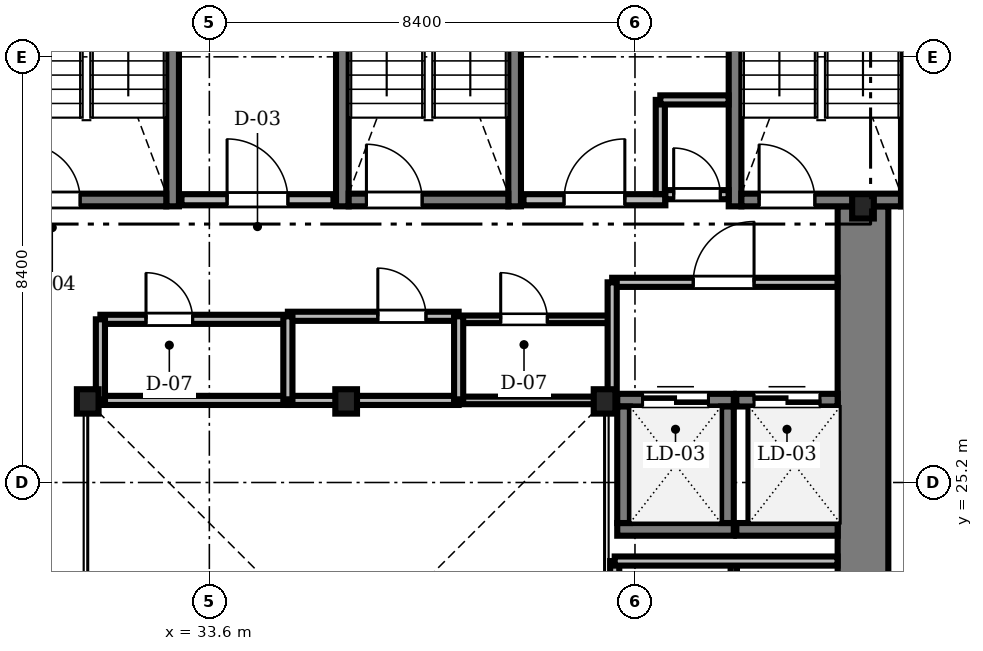
"""IFC4 building model, lengths in metres.
Left out: names, types, materials, properties, quantities, classifications, styles, units other than length and angle.
Written with IfcOpenShell. Run it as: python <this file> out.ifc"""

import sys

from ifc_helpers import new_model, si_unit, direction, frame, frame_2d, origin, origin_2d, place, context, subcontext, project, spatial, rectangle, i_section, extrude, source, transform, mapped, element, fill, save


model = new_model("IFC4")
c1 = context("Model", 3, precision=1e-05, world=origin(), true_north=direction((0.0, 1.0)))
c2 = subcontext(c1, "Body", "Model", "MODEL_VIEW")
j1 = project(units=[si_unit("LENGTHUNIT", "METRE"), si_unit("PLANEANGLEUNIT", "RADIAN")], contexts=[c1])
p1 = place(None, origin())
s1 = spatial("IfcSite", under=j1, at=p1, CompositionType="ELEMENT")
p2 = place(p1, origin())
s2 = spatial("IfcBuilding", under=s1, at=p2, CompositionType="ELEMENT")
p3 = place(p2, frame((0.0, 0.0, 45.85)))
s3 = spatial("IfcBuildingStorey", under=s2, at=p3, CompositionType="ELEMENT", Elevation=45.85)
m1 = source(origin(), c2, "Body", "SweptSolid", [
    extrude(rectangle(XDim=13.15, YDim=1.0, at=frame_2d((6.575, 0.0))), origin(), (0.0, 0.0, 1.0), 3.41),
])
p4 = place(p3, frame((46.5, 17.5, 0.0), z_axis=(0.0, 0.0, 1.0), x_axis=(0.0, 1.0, 0.0)))
e1 = element("IfcWall", 1, at=p4, inside=s3, PredefinedType="SHEAR", context=c2, shape_type="MappedRepresentation", body=[
    mapped(m1, transform((0.0, 0.0, 0.0), scale=1.0)),
])
m2 = source(origin(), c2, "Body", "SweptSolid", [
    extrude(i_section(OverallWidth=0.428, OverallDepth=0.481, WebThickness=0.04, FlangeThickness=0.063, FilletRadius=0.015, at=origin_2d()), origin(), (0.0, 0.0, 1.0), 3.41),
])
for number, where, z_axis, x_axis in (
    (2, (41.4, 26.8, 0.0), (0.0, 0.0, 1.0), (1.0, 0.0, 0.0)),
    (3, (36.3, 26.8, 0.0), (0.0, 0.0, 1.0), (1.0, 0.0, 0.0)),
    (4, (31.2, 26.8, 0.0), (0.0, 0.0, 1.0), (1.0, 0.0, 0.0)),
    (5, (46.5, 30.65, 0.0), (0.0, 0.0, 1.0), (1.0, 0.0, 0.0)),
):
    element("IfcColumn", number, at=place(p3, frame(where, z_axis=z_axis, x_axis=x_axis)), inside=s3, PredefinedType="COLUMN", context=c2, shape_type="MappedRepresentation", body=[
        mapped(m2, transform((0.0, 0.0, 0.0), scale=1.0)),
    ])
m3 = source(origin(), c2, "Body", "SweptSolid", [
    extrude(rectangle(XDim=9.15, YDim=0.25, at=frame_2d((4.575, 0.0))), origin(), (0.0, 0.0, 1.0), 3.45),
])
p5 = place(p3, frame((32.875, 30.65, 0.0), z_axis=(0.0, 0.0, 1.0), x_axis=(0.0, 1.0, 0.0)))
e6 = element("IfcWall", 6, at=p5, inside=s3, PredefinedType="SOLIDWALL", context=c2, shape_type="MappedRepresentation", body=[
    mapped(m3, transform((0.0, 0.0, 0.0), scale=1.0)),
])
m4 = source(origin(), c2, "Body", "SweptSolid", [
    extrude(rectangle(XDim=3.15, YDim=0.25, at=frame_2d((1.575, 0.0))), origin(), (0.0, 0.0, 1.0), 3.45),
])
p6 = place(p3, frame((29.6, 30.775, 0.0), z_axis=(0.0, 0.0, 1.0), x_axis=(1.0, 0.0, 0.0)))
e7 = element("IfcWall", 7, at=p6, inside=s3, PredefinedType="SOLIDWALL", context=c2, shape_type="MappedRepresentation", body=[
    mapped(m4, transform((0.0, 0.0, 0.0), scale=1.0)),
])
m5 = source(origin(), c2, "Body", "SweptSolid", [
    extrude(rectangle(XDim=1.1, YDim=2.2, at=frame_2d((0.55, 1.1))), frame((0.0, 0.135, 0.0), z_axis=(0.0, -1.0, 0.0), x_axis=(1.0, 0.0, 0.0)), (0.0, 0.0, 1.0), 0.27),
])
p7 = place(p6, frame((0.35, 0.0, 0.0)))
e8 = element("IfcOpeningElement", 8, at=p7, cuts=e7, PredefinedType="OPENING", context=c2, shape_type="MappedRepresentation", body=[
    mapped(m5, transform((0.0, 0.0, 0.0), scale=1.0)),
])
for number, where, z_axis, x_axis in (
    (9, (36.225, 30.65, 0.0), (0.0, 0.0, 1.0), (0.0, 1.0, 0.0)),
    (10, (39.625, 30.65, 0.0), (0.0, 0.0, 1.0), (0.0, 1.0, 0.0)),
):
    element("IfcWall", number, at=place(p3, frame(where, z_axis=z_axis, x_axis=x_axis)), inside=s3, PredefinedType="SOLIDWALL", context=c2, shape_type="MappedRepresentation", body=[
        mapped(m3, transform((0.0, 0.0, 0.0), scale=1.0)),
    ])
p8 = place(p3, frame((36.35, 30.775, 0.0), z_axis=(0.0, 0.0, 1.0), x_axis=(1.0, 0.0, 0.0)))
e11 = element("IfcWall", 11, at=p8, inside=s3, PredefinedType="SOLIDWALL", context=c2, shape_type="MappedRepresentation", body=[
    mapped(m4, transform((0.0, 0.0, 0.0), scale=1.0)),
])
p9 = place(p8, frame((0.35, 0.0, 0.0)))
e12 = element("IfcOpeningElement", 12, at=p9, cuts=e11, PredefinedType="OPENING", context=c2, shape_type="MappedRepresentation", body=[
    mapped(m5, transform((0.0, 0.0, 0.0), scale=1.0)),
])
for number, where, z_axis, x_axis in (
    (13, (43.975, 30.65, 0.0), (0.0, 0.0, 1.0), (0.0, 1.0, 0.0)),
    (14, (47.375, 30.65, 0.0), (0.0, 0.0, 1.0), (0.0, 1.0, 0.0)),
):
    element("IfcWall", number, at=place(p3, frame(where, z_axis=z_axis, x_axis=x_axis)), inside=s3, PredefinedType="SOLIDWALL", context=c2, shape_type="MappedRepresentation", body=[
        mapped(m3, transform((0.0, 0.0, 0.0), scale=1.0)),
    ])
p10 = place(p3, frame((44.1, 30.775, 0.0), z_axis=(0.0, 0.0, 1.0), x_axis=(1.0, 0.0, 0.0)))
e15 = element("IfcWall", 15, at=p10, inside=s3, PredefinedType="SOLIDWALL", context=c2, shape_type="MappedRepresentation", body=[
    mapped(m4, transform((0.0, 0.0, 0.0), scale=1.0)),
])
p11 = place(p10, frame((0.35, 0.0, 0.0)))
e16 = element("IfcOpeningElement", 16, at=p11, cuts=e15, PredefinedType="OPENING", context=c2, shape_type="MappedRepresentation", body=[
    mapped(m5, transform((0.0, 0.0, 0.0), scale=1.0)),
])
m6 = source(origin(), c2, "Body", "SweptSolid", [
    extrude(rectangle(XDim=3.0, YDim=0.22, at=frame_2d((1.5, 0.0))), origin(), (0.0, 0.0, 1.0), 3.41),
])
p12 = place(p3, frame((33.05, 30.78, 0.0), z_axis=(0.0, 0.0, 1.0), x_axis=(1.0, 0.0, 0.0)))
e17 = element("IfcWall", 17, at=p12, inside=s3, PredefinedType="SOLIDWALL", context=c2, shape_type="MappedRepresentation", body=[
    mapped(m6, transform((0.0, 0.0, 0.0), scale=1.0)),
])
m7 = source(origin(), c2, "Body", "SweptSolid", [
    extrude(rectangle(XDim=1.2, YDim=2.2, at=frame_2d((0.6, 1.1))), frame((0.0, 0.12, 0.0), z_axis=(0.0, -1.0, 0.0), x_axis=(1.0, 0.0, 0.0)), (0.0, 0.0, 1.0), 0.24),
])
p13 = place(p12, frame((0.9, 0.0, 0.0)))
e18 = element("IfcOpeningElement", 18, at=p13, cuts=e17, PredefinedType="OPENING", context=c2, shape_type="MappedRepresentation", body=[
    mapped(m7, transform((0.0, 0.0, 0.0), scale=1.0)),
])
m8 = source(origin(), c2, "Body", "SweptSolid", [
    extrude(rectangle(XDim=2.8, YDim=0.22, at=frame_2d((1.4, 0.0))), origin(), (0.0, 0.0, 1.0), 3.41),
])
p14 = place(p3, frame((39.8, 30.78, 0.0), z_axis=(0.0, 0.0, 1.0), x_axis=(1.0, 0.0, 0.0)))
e19 = element("IfcWall", 19, at=p14, inside=s3, PredefinedType="SOLIDWALL", context=c2, shape_type="MappedRepresentation", body=[
    mapped(m8, transform((0.0, 0.0, 0.0), scale=1.0)),
])
p15 = place(p14, frame((0.8, 0.0, 0.0)))
e20 = element("IfcOpeningElement", 20, at=p15, cuts=e19, PredefinedType="OPENING", context=c2, shape_type="MappedRepresentation", body=[
    mapped(m7, transform((0.0, 0.0, 0.0), scale=1.0)),
])
m9 = source(origin(), c2, "Body", "SweptSolid", [
    extrude(rectangle(XDim=2.3, YDim=0.25, at=frame_2d((1.15, 0.0))), origin(), (0.0, 0.0, 1.0), 3.41),
])
p16 = place(p3, frame((41.65, 24.275, 0.0), z_axis=(0.0, 0.0, 1.0), x_axis=(1.0, 0.0, 0.0)))
e21 = element("IfcWall", 21, at=p16, inside=s3, PredefinedType="SOLIDWALL", context=c2, shape_type="MappedRepresentation", body=[
    mapped(m9, transform((0.0, 0.0, 0.0), scale=1.0)),
])
p17 = place(p3, frame((41.65, 26.825, 0.0), z_axis=(0.0, 0.0, 1.0), x_axis=(1.0, 0.0, 0.0)))
e22 = element("IfcWall", 22, at=p17, inside=s3, PredefinedType="SOLIDWALL", context=c2, shape_type="MappedRepresentation", body=[
    mapped(m9, transform((0.0, 0.0, 0.0), scale=1.0)),
])
m10 = source(origin(), c2, "Body", "SweptSolid", [
    extrude(rectangle(XDim=1.3, YDim=2.3, at=frame_2d((0.65, 1.15))), frame((0.0, 0.135, 0.0), z_axis=(0.0, -1.0, 0.0), x_axis=(1.0, 0.0, 0.0)), (0.0, 0.0, 1.0), 0.27),
])
p18 = place(p17, frame((0.5, 0.0, 0.0)))
e23 = element("IfcOpeningElement", 23, at=p18, cuts=e22, PredefinedType="OPENING", context=c2, shape_type="MappedRepresentation", body=[
    mapped(m10, transform((0.0, 0.0, 0.0), scale=1.0)),
])
for number, where, z_axis, x_axis in (
    (24, (41.775, 24.4, 0.0), (0.0, 0.0, 1.0), (0.0, 1.0, 0.0)),
    (25, (43.825, 24.4, 0.0), (0.0, 0.0, 1.0), (0.0, 1.0, 0.0)),
):
    element("IfcWall", number, at=place(p3, frame(where, z_axis=z_axis, x_axis=x_axis)), inside=s3, PredefinedType="SOLIDWALL", context=c2, shape_type="MappedRepresentation", body=[
        mapped(m9, transform((0.0, 0.0, 0.0), scale=1.0)),
    ])
m11 = source(origin(), c2, "Body", "SweptSolid", [
    extrude(rectangle(XDim=2.0, YDim=0.25, at=frame_2d((1.0, 0.0))), origin(), (0.0, 0.0, 1.0), 3.41),
])
p19 = place(p3, frame((44.0, 24.275, 0.0), z_axis=(0.0, 0.0, 1.0), x_axis=(1.0, 0.0, 0.0)))
e26 = element("IfcWall", 26, at=p19, inside=s3, PredefinedType="SOLIDWALL", context=c2, shape_type="MappedRepresentation", body=[
    mapped(m11, transform((0.0, 0.0, 0.0), scale=1.0)),
])
p20 = place(p3, frame((44.0, 26.825, 0.0), z_axis=(0.0, 0.0, 1.0), x_axis=(1.0, 0.0, 0.0)))
e27 = element("IfcWall", 27, at=p20, inside=s3, PredefinedType="SOLIDWALL", context=c2, shape_type="MappedRepresentation", body=[
    mapped(m11, transform((0.0, 0.0, 0.0), scale=1.0)),
])
p21 = place(p20, frame((0.35, 0.0, 0.0)))
e28 = element("IfcOpeningElement", 28, at=p21, cuts=e27, PredefinedType="OPENING", context=c2, shape_type="MappedRepresentation", body=[
    mapped(m10, transform((0.0, 0.0, 0.0), scale=1.0)),
])
m12 = source(origin(), c2, "Body", "SweptSolid", [
    extrude(rectangle(XDim=4.448, YDim=0.18, at=frame_2d((2.224, 0.0))), origin(), (0.0, 0.0, 1.0), 3.042),
])
p22 = place(p3, frame((41.55, 29.15, 0.0), z_axis=(0.0, 0.0, 1.0), x_axis=(1.0, 0.0, 0.0)))
e29 = element("IfcWall", 29, at=p22, inside=s3, PredefinedType="PARTITIONING", context=c2, shape_type="MappedRepresentation", body=[
    mapped(m12, transform((0.0, 0.0, 0.0), scale=1.0)),
])
m13 = source(origin(), c2, "Body", "SweptSolid", [
    extrude(rectangle(XDim=1.2, YDim=2.2, at=frame_2d((0.6, 1.1))), frame((0.0, 0.1, 0.0), z_axis=(0.0, -1.0, 0.0), x_axis=(1.0, 0.0, 0.0)), (0.0, 0.0, 1.0), 0.2),
])
p23 = place(p22, frame((1.6, 0.0, 0.0)))
e30 = element("IfcOpeningElement", 30, at=p23, cuts=e29, PredefinedType="OPENING", context=c2, shape_type="MappedRepresentation", body=[
    mapped(m13, transform((0.0, 0.0, 0.0), scale=1.0)),
])
m14 = source(origin(), c2, "Body", "SweptSolid", [
    extrude(rectangle(XDim=3.7, YDim=0.18, at=frame_2d((1.85, 0.0))), origin(), (0.0, 0.0, 1.0), 3.042),
])
p24 = place(p3, frame((31.45, 28.42, 0.0), z_axis=(0.0, 0.0, 1.0), x_axis=(1.0, 0.0, 0.0)))
e31 = element("IfcWall", 31, at=p24, inside=s3, PredefinedType="PARTITIONING", context=c2, shape_type="MappedRepresentation", body=[
    mapped(m14, transform((0.0, 0.0, 0.0), scale=1.0)),
])
m15 = source(origin(), c2, "Body", "SweptSolid", [
    extrude(rectangle(XDim=0.92, YDim=2.1, at=frame_2d((0.46, 1.05))), frame((0.0, 0.1, 0.0), z_axis=(0.0, -1.0, 0.0), x_axis=(1.0, 0.0, 0.0)), (0.0, 0.0, 1.0), 0.2),
])
p25 = place(p24, frame((0.9, 0.0, 0.0)))
e32 = element("IfcOpeningElement", 32, at=p25, cuts=e31, PredefinedType="OPENING", context=c2, shape_type="MappedRepresentation", body=[
    mapped(m15, transform((0.0, 0.0, 0.0), scale=1.0)),
])
m16 = source(origin(), c2, "Body", "SweptSolid", [
    extrude(rectangle(XDim=3.37, YDim=0.18, at=frame_2d((1.685, 0.0))), origin(), (0.0, 0.0, 1.0), 3.41),
])
p26 = place(p3, frame((35.15, 28.48, 0.0), z_axis=(0.0, 0.0, 1.0), x_axis=(1.0, 0.0, 0.0)))
e33 = element("IfcWall", 33, at=p26, inside=s3, PredefinedType="PARTITIONING", context=c2, shape_type="MappedRepresentation", body=[
    mapped(m16, transform((0.0, 0.0, 0.0), scale=1.0)),
])
m17 = source(origin(), c2, "Body", "SweptSolid", [
    extrude(rectangle(XDim=0.95, YDim=2.15, at=frame_2d((0.475, 1.075))), frame((0.0, 0.1, 0.0), z_axis=(0.0, -1.0, 0.0), x_axis=(1.0, 0.0, 0.0)), (0.0, 0.0, 1.0), 0.2),
])
p27 = place(p26, frame((1.775, 0.0, 0.0)))
e34 = element("IfcOpeningElement", 34, at=p27, cuts=e33, PredefinedType="OPENING", context=c2, shape_type="MappedRepresentation", body=[
    mapped(m17, transform((0.0, 0.0, 0.0), scale=1.0)),
])
m18 = source(origin(), c2, "Body", "SweptSolid", [
    extrude(rectangle(XDim=3.0, YDim=0.15, at=frame_2d((1.5, 0.0))), origin(), (0.0, 0.0, 1.0), 3.41),
])
p28 = place(p3, frame((38.52, 28.42, 0.0), z_axis=(0.0, 0.0, 1.0), x_axis=(1.0, 0.0, 0.0)))
e35 = element("IfcWall", 35, at=p28, inside=s3, PredefinedType="PARTITIONING", context=c2, shape_type="MappedRepresentation", body=[
    mapped(m18, transform((0.0, 0.0, 0.0), scale=1.0)),
])
m19 = source(origin(), c2, "Body", "SweptSolid", [
    extrude(rectangle(XDim=0.92, YDim=2.1, at=frame_2d((0.46, 1.05))), frame((0.0, 0.085, 0.0), z_axis=(0.0, -1.0, 0.0), x_axis=(1.0, 0.0, 0.0)), (0.0, 0.0, 1.0), 0.17),
])
p29 = place(p28, frame((0.83, 0.0, 0.0)))
e36 = element("IfcOpeningElement", 36, at=p29, cuts=e35, PredefinedType="OPENING", context=c2, shape_type="MappedRepresentation", body=[
    mapped(m19, transform((0.0, 0.0, 0.0), scale=1.0)),
])
m20 = source(origin(), c2, "Body", "SweptSolid", [
    extrude(rectangle(XDim=1.248, YDim=0.18, at=frame_2d((0.624, 0.0))), origin(), (0.0, 0.0, 1.0), 3.41),
])
p30 = place(p3, frame((42.6, 30.88, 0.0), z_axis=(0.0, 0.0, 1.0), x_axis=(1.0, 0.0, 0.0)))
e37 = element("IfcWall", 37, at=p30, inside=s3, PredefinedType="PARTITIONING", context=c2, shape_type="MappedRepresentation", body=[
    mapped(m20, transform((0.0, 0.0, 0.0), scale=1.0)),
])
p31 = place(p30, frame((0.164, 0.0, 0.0)))
e38 = element("IfcOpeningElement", 38, at=p31, cuts=e37, PredefinedType="OPENING", context=c2, shape_type="MappedRepresentation", body=[
    mapped(m15, transform((0.0, 0.0, 0.0), scale=1.0)),
])
m21 = source(origin(), c2, "Body", "SweptSolid", [
    extrude(rectangle(XDim=7.15, YDim=0.18, at=frame_2d((3.575, 0.0))), origin(), (0.0, 0.0, 1.0), 2.802),
])
p32 = place(p3, frame((41.6, 16.5, 0.0), z_axis=(0.0, 0.0, 1.0), x_axis=(0.0, 1.0, 0.0)))
e39 = element("IfcWall", 39, at=p32, inside=s3, PredefinedType="PARTITIONING", context=c2, shape_type="MappedRepresentation", body=[
    mapped(m21, transform((0.0, 0.0, 0.0), scale=1.0)),
])
m22 = source(origin(), c2, "Body", "SweptSolid", [
    extrude(rectangle(XDim=7.15, YDim=0.125, at=frame_2d((3.575, 0.0))), origin(), (0.0, 0.0, 1.0), 2.802),
])
p33 = place(p3, frame((43.95, 16.5, 0.0), z_axis=(0.0, 0.0, 1.0), x_axis=(0.0, 1.0, 0.0)))
e40 = element("IfcWall", 40, at=p33, inside=s3, PredefinedType="PARTITIONING", context=c2, shape_type="MappedRepresentation", body=[
    mapped(m22, transform((0.0, 0.0, 0.0), scale=1.0)),
])
m23 = source(origin(), c2, "Body", "SweptSolid", [
    extrude(rectangle(XDim=4.398, YDim=0.18, at=frame_2d((2.199, 0.0))), origin(), (0.0, 0.0, 1.0), 3.41),
])
p34 = place(p3, frame((41.6, 23.65, 0.0), z_axis=(0.0, 0.0, 1.0), x_axis=(1.0, 0.0, 0.0)))
e41 = element("IfcWall", 41, at=p34, inside=s3, PredefinedType="PARTITIONING", context=c2, shape_type="MappedRepresentation", body=[
    mapped(m23, transform((0.0, 0.0, 0.0), scale=1.0)),
])
m24 = source(origin(), c2, "Body", "SweptSolid", [
    extrude(rectangle(XDim=3.7, YDim=0.18, at=frame_2d((1.85, 0.0))), origin(), (0.0, 0.0, 1.0), 2.952),
])
p35 = place(p3, frame((31.45, 26.82, 0.0), z_axis=(0.0, 0.0, 1.0), x_axis=(1.0, 0.0, 0.0)))
e42 = element("IfcWall", 42, at=p35, inside=s3, PredefinedType="PARTITIONING", context=c2, shape_type="MappedRepresentation", body=[
    mapped(m24, transform((0.0, 0.0, 0.0), scale=1.0)),
])
m25 = source(origin(), c2, "Body", "SweptSolid", [
    extrude(rectangle(XDim=3.37, YDim=0.18, at=frame_2d((1.685, 0.0))), origin(), (0.0, 0.0, 1.0), 2.952),
])
p36 = place(p3, frame((35.15, 26.82, 0.0), z_axis=(0.0, 0.0, 1.0), x_axis=(1.0, 0.0, 0.0)))
e43 = element("IfcWall", 43, at=p36, inside=s3, PredefinedType="PARTITIONING", context=c2, shape_type="MappedRepresentation", body=[
    mapped(m25, transform((0.0, 0.0, 0.0), scale=1.0)),
])
m26 = source(origin(), c2, "Body", "SweptSolid", [
    extrude(rectangle(XDim=3.0, YDim=0.15, at=frame_2d((1.5, 0.0))), origin(), (0.0, 0.0, 1.0), 2.802),
])
p37 = place(p3, frame((38.52, 26.82, 0.0), z_axis=(0.0, 0.0, 1.0), x_axis=(1.0, 0.0, 0.0)))
e44 = element("IfcWall", 44, at=p37, inside=s3, PredefinedType="PARTITIONING", context=c2, shape_type="MappedRepresentation", body=[
    mapped(m26, transform((0.0, 0.0, 0.0), scale=1.0)),
])
m27 = source(origin(), c2, "Body", "SweptSolid", [
    extrude(rectangle(XDim=2.35, YDim=0.18, at=frame_2d((1.175, 0.0))), origin(), (0.0, 0.0, 1.0), 2.802),
])
p38 = place(p3, frame((41.55, 26.8, 0.0), z_axis=(0.0, 0.0, 1.0), x_axis=(0.0, 1.0, 0.0)))
e45 = element("IfcWall", 45, at=p38, inside=s3, PredefinedType="PARTITIONING", context=c2, shape_type="MappedRepresentation", body=[
    mapped(m27, transform((0.0, 0.0, 0.0), scale=1.0)),
])
m28 = source(origin(), c2, "Body", "SweptSolid", [
    extrude(rectangle(XDim=1.858, YDim=0.18, at=frame_2d((0.929, 0.0))), origin(), (0.0, 0.0, 1.0), 3.41),
])
p39 = place(p3, frame((42.5, 30.892, 0.0), z_axis=(0.0, 0.0, 1.0), x_axis=(0.0, 1.0, 0.0)))
e46 = element("IfcWall", 46, at=p39, inside=s3, PredefinedType="PARTITIONING", context=c2, shape_type="MappedRepresentation", body=[
    mapped(m28, transform((0.0, 0.0, 0.0), scale=1.0)),
])
m29 = source(origin(), c2, "Body", "SweptSolid", [
    extrude(rectangle(XDim=1.66, YDim=0.18, at=frame_2d((0.83, 0.0))), origin(), (0.0, 0.0, 1.0), 2.952),
])
for number, where, z_axis, x_axis in (
    (47, (35.15, 26.82, 0.0), (0.0, 0.0, 1.0), (0.0, 1.0, 0.0)),
    (48, (38.52, 26.82, 0.0), (0.0, 0.0, 1.0), (0.0, 1.0, 0.0)),
):
    element("IfcWall", number, at=place(p3, frame(where, z_axis=z_axis, x_axis=x_axis)), inside=s3, PredefinedType="PARTITIONING", context=c2, shape_type="MappedRepresentation", body=[
        mapped(m29, transform((0.0, 0.0, 0.0), scale=1.0)),
    ])
m30 = source(origin(), c2, "Body", "SweptSolid", [
    extrude(rectangle(XDim=1.6, YDim=0.18, at=frame_2d((0.8, 0.0))), origin(), (0.0, 0.0, 1.0), 2.952),
])
p40 = place(p3, frame((31.45, 26.82, 0.0), z_axis=(0.0, 0.0, 1.0), x_axis=(0.0, 1.0, 0.0)))
e49 = element("IfcWall", 49, at=p40, inside=s3, PredefinedType="PARTITIONING", context=c2, shape_type="MappedRepresentation", body=[
    mapped(m30, transform((0.0, 0.0, 0.0), scale=1.0)),
])
m31 = source(origin(), c2, "Body", "SweptSolid", [
    extrude(rectangle(XDim=1.348, YDim=0.18, at=frame_2d((0.674, 0.0))), origin(), (0.0, 0.0, 1.0), 3.41),
])
p41 = place(p3, frame((42.5, 32.75, 0.0), z_axis=(0.0, 0.0, 1.0), x_axis=(1.0, 0.0, 0.0)))
e50 = element("IfcWall", 50, at=p41, inside=s3, PredefinedType="PARTITIONING", context=c2, shape_type="MappedRepresentation", body=[
    mapped(m31, transform((0.0, 0.0, 0.0), scale=1.0)),
])
m32 = source(origin(), c2, "Body", "SweptSolid", [
    extrude(rectangle(XDim=1.1, YDim=2.2, at=frame_2d((0.55, 1.1))), frame((0.0, 0.025, 0.0), z_axis=(0.0, -1.0, 0.0), x_axis=(1.0, 0.0, 0.0)), (0.0, 0.0, 1.0), 0.05),
])
p42 = place(p7, origin())
e51 = element("IfcDoor", 51, at=p42, inside=s3, OperationType="SINGLE_SWING_LEFT", PredefinedType="DOOR", context=c2, shape_type="MappedRepresentation", body=[
    mapped(m32, transform((0.0, 0.0, 0.0), scale=1.0)),
])
fill(e8, e51)
p43 = place(p9, origin())
e52 = element("IfcDoor", 52, at=p43, inside=s3, OperationType="SINGLE_SWING_LEFT", PredefinedType="DOOR", context=c2, shape_type="MappedRepresentation", body=[
    mapped(m32, transform((0.0, 0.0, 0.0), scale=1.0)),
])
fill(e12, e52)
p44 = place(p11, origin())
e53 = element("IfcDoor", 53, at=p44, inside=s3, OperationType="SINGLE_SWING_LEFT", PredefinedType="DOOR", context=c2, shape_type="MappedRepresentation", body=[
    mapped(m32, transform((0.0, 0.0, 0.0), scale=1.0)),
])
fill(e16, e53)
m33 = source(origin(), c2, "Body", "SweptSolid", [
    extrude(rectangle(XDim=1.2, YDim=2.2, at=frame_2d((0.6, 1.1))), frame((0.0, 0.025, 0.0), z_axis=(0.0, -1.0, 0.0), x_axis=(1.0, 0.0, 0.0)), (0.0, 0.0, 1.0), 0.05),
])
p45 = place(p13, origin())
e54 = element("IfcDoor", 54, at=p45, inside=s3, OperationType="SINGLE_SWING_LEFT", PredefinedType="DOOR", context=c2, shape_type="MappedRepresentation", body=[
    mapped(m33, transform((0.0, 0.0, 0.0), scale=1.0)),
])
fill(e18, e54)
p46 = place(p15, origin())
e55 = element("IfcDoor", 55, at=p46, inside=s3, OperationType="SINGLE_SWING_RIGHT", PredefinedType="DOOR", context=c2, shape_type="MappedRepresentation", body=[
    mapped(m33, transform((0.0, 0.0, 0.0), scale=1.0)),
])
fill(e20, e55)
m34 = source(origin(), c2, "Body", "SweptSolid", [
    extrude(rectangle(XDim=1.3, YDim=2.3, at=frame_2d((0.65, 1.15))), frame((0.0, 0.025, 0.0), z_axis=(0.0, -1.0, 0.0), x_axis=(1.0, 0.0, 0.0)), (0.0, 0.0, 1.0), 0.05),
])
p47 = place(p18, origin())
e56 = element("IfcDoor", 56, at=p47, inside=s3, OperationType="DOUBLE_DOOR_SLIDING", PredefinedType="DOOR", context=c2, shape_type="MappedRepresentation", body=[
    mapped(m34, transform((0.0, 0.0, 0.0), scale=1.0)),
])
fill(e23, e56)
p48 = place(p21, origin())
e57 = element("IfcDoor", 57, at=p48, inside=s3, OperationType="DOUBLE_DOOR_SLIDING", PredefinedType="DOOR", context=c2, shape_type="MappedRepresentation", body=[
    mapped(m34, transform((0.0, 0.0, 0.0), scale=1.0)),
])
fill(e28, e57)
p49 = place(p23, origin())
e58 = element("IfcDoor", 58, at=p49, inside=s3, OperationType="SINGLE_SWING_RIGHT", PredefinedType="DOOR", context=c2, shape_type="MappedRepresentation", body=[
    mapped(m33, transform((0.0, 0.0, 0.0), scale=1.0)),
])
fill(e30, e58)
m35 = source(origin(), c2, "Body", "SweptSolid", [
    extrude(rectangle(XDim=0.92, YDim=2.1, at=frame_2d((0.46, 1.05))), frame((0.0, 0.025, 0.0), z_axis=(0.0, -1.0, 0.0), x_axis=(1.0, 0.0, 0.0)), (0.0, 0.0, 1.0), 0.05),
])
p50 = place(p25, origin())
e59 = element("IfcDoor", 59, at=p50, inside=s3, OperationType="SINGLE_SWING_LEFT", PredefinedType="DOOR", context=c2, shape_type="MappedRepresentation", body=[
    mapped(m35, transform((0.0, 0.0, 0.0), scale=1.0)),
])
fill(e32, e59)
m36 = source(origin(), c2, "Body", "SweptSolid", [
    extrude(rectangle(XDim=0.95, YDim=2.15, at=frame_2d((0.475, 1.075))), frame((0.0, 0.025, 0.0), z_axis=(0.0, -1.0, 0.0), x_axis=(1.0, 0.0, 0.0)), (0.0, 0.0, 1.0), 0.05),
])
p51 = place(p27, origin())
e60 = element("IfcDoor", 60, at=p51, inside=s3, OperationType="SINGLE_SWING_LEFT", PredefinedType="DOOR", context=c2, shape_type="MappedRepresentation", body=[
    mapped(m36, transform((0.0, 0.0, 0.0), scale=1.0)),
])
fill(e34, e60)
p52 = place(p29, origin())
e61 = element("IfcDoor", 61, at=p52, inside=s3, OperationType="SINGLE_SWING_LEFT", PredefinedType="DOOR", context=c2, shape_type="MappedRepresentation", body=[
    mapped(m35, transform((0.0, 0.0, 0.0), scale=1.0)),
])
fill(e36, e61)
p53 = place(p31, origin())
e62 = element("IfcDoor", 62, at=p53, inside=s3, OperationType="SINGLE_SWING_LEFT", PredefinedType="DOOR", context=c2, shape_type="MappedRepresentation", body=[
    mapped(m35, transform((0.0, 0.0, 0.0), scale=1.0)),
])
fill(e38, e62)
save(model, sys.argv[1])
